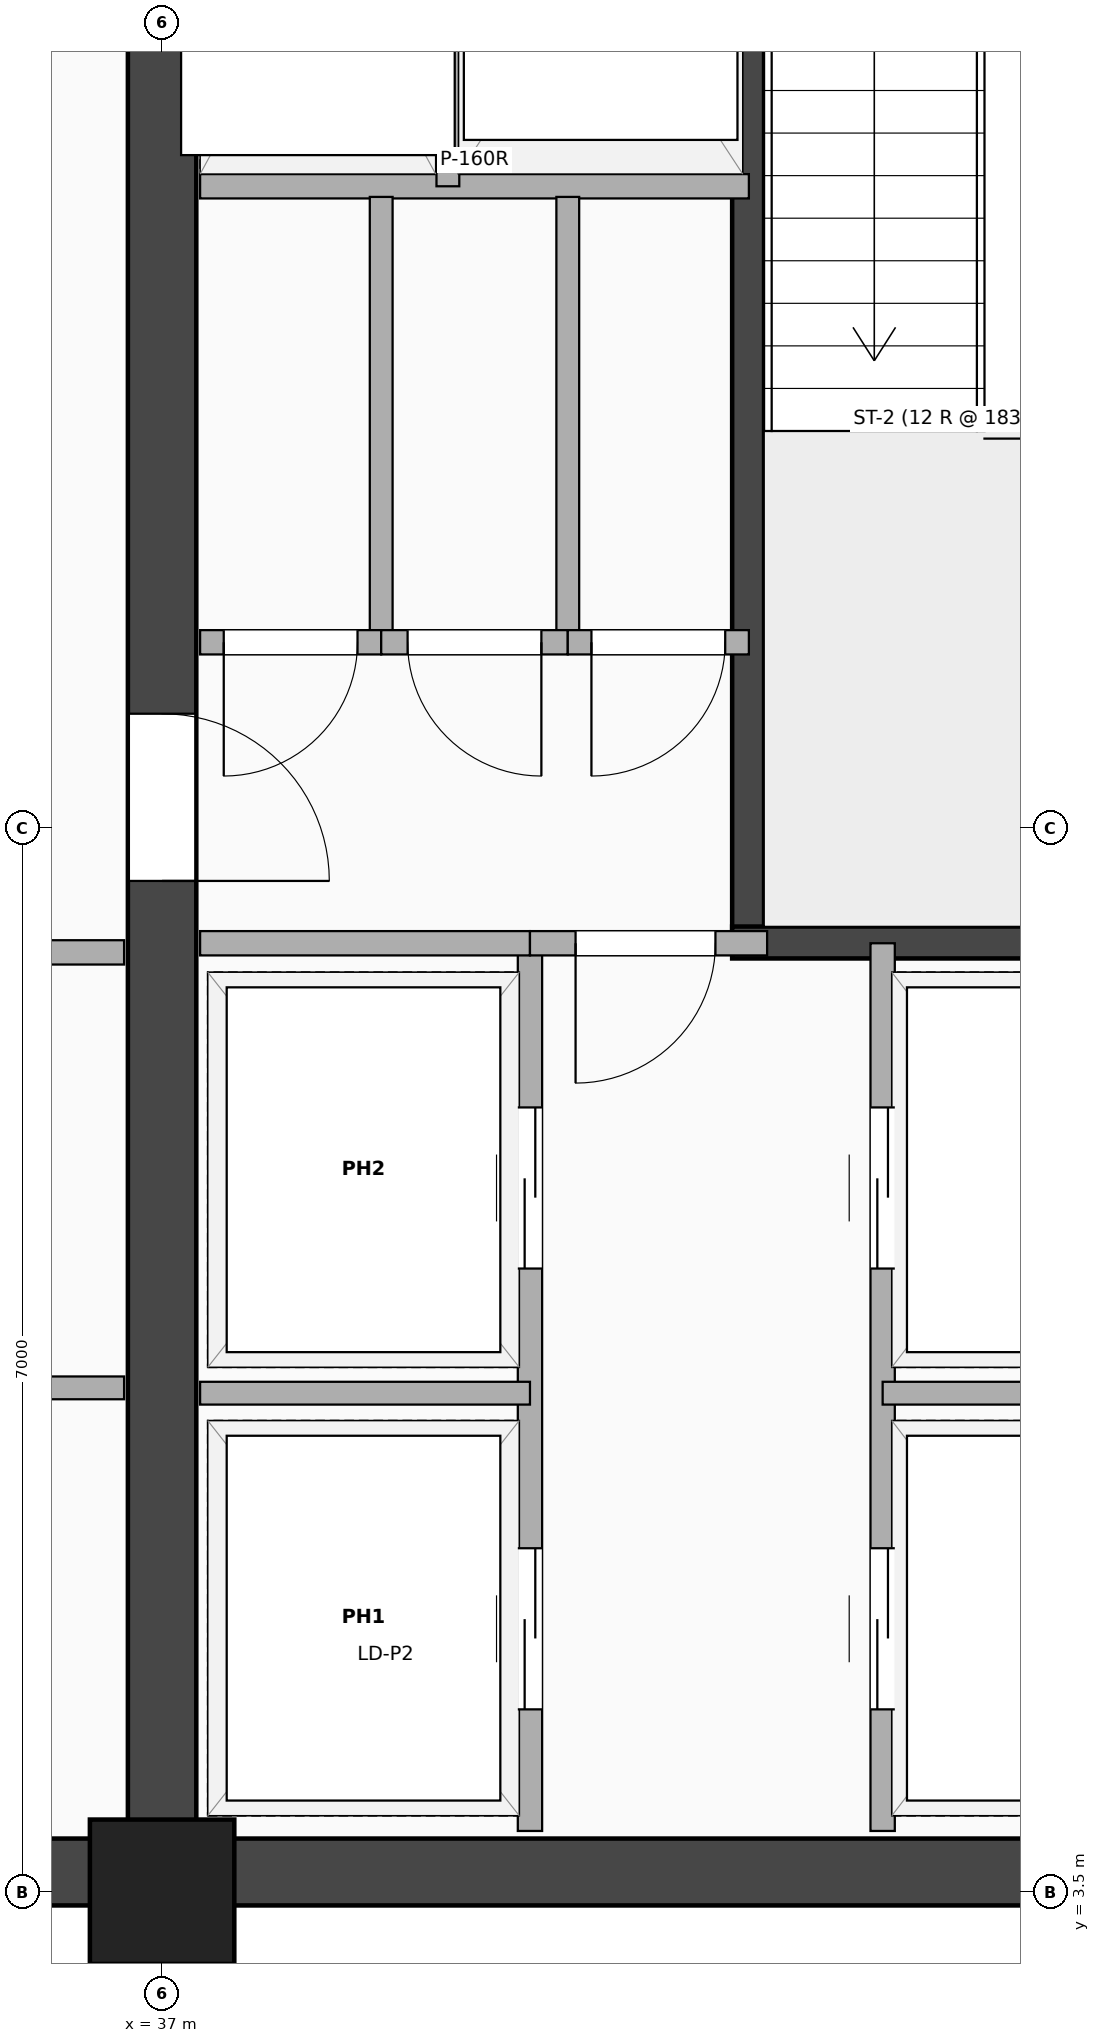
"""IFC4 building model, lengths in metres.
Left out: names, types, materials, properties, quantities, classifications, styles, units other than length and angle.
Written with IfcOpenShell. Run it as: python <this file> out.ifc"""

import sys

from ifc_helpers import new_model, si_unit, direction, frame, frame_2d, origin, origin_2d, place, context, subcontext, project, spatial, rectangle, extrude, element, fill, save


model = new_model("IFC4")
c1 = context("Model", 3, precision=1e-05, world=origin(), true_north=direction((0.0, 1.0)))
c2 = subcontext(c1, "Body", "Model", "MODEL_VIEW")
j1 = project(units=[si_unit("LENGTHUNIT", "METRE"), si_unit("PLANEANGLEUNIT", "RADIAN")], contexts=[c1])
p1 = place(None, origin())
s1 = spatial("IfcSite", under=j1, at=p1, CompositionType="ELEMENT")
p2 = place(p1, origin())
s2 = spatial("IfcBuilding", under=s1, at=p2, CompositionType="ELEMENT")
p3 = place(p2, frame((0.0, 0.0, 192.5)))
s3 = spatial("IfcBuildingStorey", under=s2, at=p3, CompositionType="ELEMENT", Elevation=192.5)
p4 = place(p3, frame((20.3, 3.63, 0.0), z_axis=(0.0, 0.0, 1.0), x_axis=(1.0, 0.0, 0.0)))
e1 = element("IfcWall", 1, at=p4, inside=s3, PredefinedType="SHEAR", context=c2, shape_type="SweptSolid", body=[
    extrude(rectangle(XDim=24.5, YDim=0.44, at=frame_2d((12.25, 0.0))), origin(), (0.0, 0.0, 1.0), 4.16),
])
p5 = place(p3, frame((37.0, 3.5, 0.0), z_axis=(0.0, 0.0, 1.0), x_axis=(0.0, 1.0, 0.0)))
e2 = element("IfcWall", 2, at=p5, inside=s3, PredefinedType="SHEAR", context=c2, shape_type="SweptSolid", body=[
    extrude(rectangle(XDim=14.95, YDim=0.45, at=frame_2d((7.475, 0.0))), origin(), (0.0, 0.0, 1.0), 4.16),
])
p6 = place(p5, frame((6.65, 0.0, 0.0)))
e3 = element("IfcOpeningElement", 3, at=p6, cuts=e2, PredefinedType="OPENING", context=c2, shape_type="SweptSolid", body=[
    extrude(rectangle(XDim=1.1, YDim=2.15, at=frame_2d((0.55, 1.075))), frame((0.0, 0.235, 0.0), z_axis=(0.0, -1.0, 0.0), x_axis=(1.0, 0.0, 0.0)), (0.0, 0.0, 1.0), 0.47),
])
p7 = place(p3, frame((40.855, 9.745, 0.0), z_axis=(0.0, 0.0, 1.0), x_axis=(0.0, 1.0, 0.0)))
e4 = element("IfcWall", 4, at=p7, inside=s3, PredefinedType="SHEAR", context=c2, shape_type="SweptSolid", body=[
    extrude(rectangle(XDim=8.01, YDim=0.21, at=frame_2d((4.005, 0.0))), origin(), (0.0, 0.0, 1.0), 4.16),
])
p8 = place(p3, frame((40.75, 9.745, 0.0), z_axis=(0.0, 0.0, 1.0), x_axis=(1.0, 0.0, 0.0)))
e5 = element("IfcWall", 5, at=p8, inside=s3, PredefinedType="SHEAR", context=c2, shape_type="SweptSolid", body=[
    extrude(rectangle(XDim=3.66, YDim=0.21, at=frame_2d((1.83, 0.0))), origin(), (0.0, 0.0, 1.0), 4.16),
])
p9 = place(p3, frame((37.0, 3.5, -0.24), z_axis=(0.0, 0.0, 1.0), x_axis=(1.0, 0.0, 0.0)))
e6 = element("IfcColumn", 6, at=p9, inside=s3, PredefinedType="COLUMN", context=c2, shape_type="SweptSolid", body=[
    extrude(rectangle(XDim=0.95, YDim=0.95, at=origin_2d()), origin(), (0.0, 0.0, 1.0), 4.4),
])
p10 = place(p3, frame((37.25, 14.72, 0.0), z_axis=(0.0, 0.0, 1.0), x_axis=(1.0, 0.0, 0.0)))
e7 = element("IfcWall", 7, at=p10, inside=s3, PredefinedType="PARTITIONING", context=c2, shape_type="SweptSolid", body=[
    extrude(rectangle(XDim=3.61, YDim=0.16, at=frame_2d((1.805, 0.0))), origin(), (0.0, 0.0, 1.0), 4.16),
])
p11 = place(p3, frame((38.88, 14.72, 0.0), z_axis=(0.0, 0.0, 1.0), x_axis=(0.0, 1.0, 0.0)))
e8 = element("IfcWall", 8, at=p11, inside=s3, PredefinedType="PARTITIONING", context=c2, shape_type="SweptSolid", body=[
    extrude(rectangle(XDim=3.04, YDim=0.15, at=frame_2d((1.52, 0.0))), origin(), (0.0, 0.0, 1.0), 4.16),
])
p12 = place(p3, frame((38.441, 11.72, 0.0), z_axis=(0.0, 0.0, 1.0), x_axis=(0.0, 1.0, 0.0)))
e9 = element("IfcWall", 9, at=p12, inside=s3, PredefinedType="PARTITIONING", context=c2, shape_type="SweptSolid", body=[
    extrude(rectangle(XDim=2.93, YDim=0.15, at=frame_2d((1.465, 0.0))), origin(), (0.0, 0.0, 1.0), 4.16),
])
p13 = place(p3, frame((37.25, 11.72, 0.0), z_axis=(0.0, 0.0, 1.0), x_axis=(1.0, 0.0, 0.0)))
e10 = element("IfcWall", 10, at=p13, inside=s3, PredefinedType="PARTITIONING", context=c2, shape_type="SweptSolid", body=[
    extrude(rectangle(XDim=1.191, YDim=0.16, at=frame_2d((0.596, 0.0))), origin(), (0.0, 0.0, 1.0), 4.16),
])
p14 = place(p13, frame((0.156, 0.0, 0.0)))
e11 = element("IfcOpeningElement", 11, at=p14, cuts=e10, PredefinedType="OPENING", context=c2, shape_type="SweptSolid", body=[
    extrude(rectangle(XDim=0.88, YDim=2.08, at=frame_2d((0.44, 1.04))), frame((0.0, 0.09, 0.0), z_axis=(0.0, -1.0, 0.0), x_axis=(1.0, 0.0, 0.0)), (0.0, 0.0, 1.0), 0.18),
])
p15 = place(p3, frame((39.669, 11.72, 0.0), z_axis=(0.0, 0.0, 1.0), x_axis=(0.0, 1.0, 0.0)))
e12 = element("IfcWall", 12, at=p15, inside=s3, PredefinedType="PARTITIONING", context=c2, shape_type="SweptSolid", body=[
    extrude(rectangle(XDim=2.93, YDim=0.15, at=frame_2d((1.465, 0.0))), origin(), (0.0, 0.0, 1.0), 4.16),
])
p16 = place(p3, frame((38.441, 11.72, 0.0), z_axis=(0.0, 0.0, 1.0), x_axis=(1.0, 0.0, 0.0)))
e13 = element("IfcWall", 13, at=p16, inside=s3, PredefinedType="PARTITIONING", context=c2, shape_type="SweptSolid", body=[
    extrude(rectangle(XDim=1.227, YDim=0.16, at=frame_2d((0.614, 0.0))), origin(), (0.0, 0.0, 1.0), 4.16),
])
p17 = place(p16, frame((0.174, 0.0, 0.0)))
e14 = element("IfcOpeningElement", 14, at=p17, cuts=e13, PredefinedType="OPENING", context=c2, shape_type="SweptSolid", body=[
    extrude(rectangle(XDim=0.88, YDim=2.08, at=frame_2d((0.44, 1.04))), frame((0.0, 0.09, 0.0), z_axis=(0.0, -1.0, 0.0), x_axis=(1.0, 0.0, 0.0)), (0.0, 0.0, 1.0), 0.18),
])
p18 = place(p3, frame((39.669, 11.72, 0.0), z_axis=(0.0, 0.0, 1.0), x_axis=(1.0, 0.0, 0.0)))
e15 = element("IfcWall", 15, at=p18, inside=s3, PredefinedType="PARTITIONING", context=c2, shape_type="SweptSolid", body=[
    extrude(rectangle(XDim=1.191, YDim=0.16, at=frame_2d((0.596, 0.0))), origin(), (0.0, 0.0, 1.0), 4.16),
])
p19 = place(p18, frame((0.156, 0.0, 0.0)))
e16 = element("IfcOpeningElement", 16, at=p19, cuts=e15, PredefinedType="OPENING", context=c2, shape_type="SweptSolid", body=[
    extrude(rectangle(XDim=0.88, YDim=2.08, at=frame_2d((0.44, 1.04))), frame((0.0, 0.09, 0.0), z_axis=(0.0, -1.0, 0.0), x_axis=(1.0, 0.0, 0.0)), (0.0, 0.0, 1.0), 0.18),
])
p20 = place(p3, frame((39.42, 3.9, 0.0), z_axis=(0.0, 0.0, 1.0), x_axis=(0.0, 1.0, 0.0)))
e17 = element("IfcWall", 17, at=p20, inside=s3, PredefinedType="PARTITIONING", context=c2, shape_type="SweptSolid", body=[
    extrude(rectangle(XDim=5.84, YDim=0.16, at=frame_2d((2.92, 0.0))), origin(), (0.0, 0.0, 1.0), 4.16),
])
p21 = place(p20, frame((1.86, 0.0, 0.0), z_axis=(0.0, 0.0, 1.0), x_axis=(-1.0, 0.0, 0.0)))
e18 = element("IfcOpeningElement", 18, at=p21, cuts=e17, PredefinedType="OPENING", context=c2, shape_type="SweptSolid", body=[
    extrude(rectangle(XDim=1.06, YDim=2.16, at=frame_2d((0.53, 1.08))), frame((0.0, 0.09, 0.0), z_axis=(0.0, -1.0, 0.0), x_axis=(1.0, 0.0, 0.0)), (0.0, 0.0, 1.0), 0.18),
])
p22 = place(p20, frame((4.76, 0.0, 0.0), z_axis=(0.0, 0.0, 1.0), x_axis=(-1.0, 0.0, 0.0)))
e19 = element("IfcOpeningElement", 19, at=p22, cuts=e17, PredefinedType="OPENING", context=c2, shape_type="SweptSolid", body=[
    extrude(rectangle(XDim=1.06, YDim=2.16, at=frame_2d((0.53, 1.08))), frame((0.0, 0.09, 0.0), z_axis=(0.0, -1.0, 0.0), x_axis=(1.0, 0.0, 0.0)), (0.0, 0.0, 1.0), 0.18),
])
p23 = place(p3, frame((41.74, 3.9, 0.0), z_axis=(0.0, 0.0, 1.0), x_axis=(0.0, 1.0, 0.0)))
e20 = element("IfcWall", 20, at=p23, inside=s3, PredefinedType="PARTITIONING", context=c2, shape_type="SweptSolid", body=[
    extrude(rectangle(XDim=5.84, YDim=0.16, at=frame_2d((2.92, 0.0))), origin(), (0.0, 0.0, 1.0), 4.16),
])
p24 = place(p23, frame((0.8, 0.0, 0.0)))
e21 = element("IfcOpeningElement", 21, at=p24, cuts=e20, PredefinedType="OPENING", context=c2, shape_type="SweptSolid", body=[
    extrude(rectangle(XDim=1.06, YDim=2.16, at=frame_2d((0.53, 1.08))), frame((0.0, 0.09, 0.0), z_axis=(0.0, -1.0, 0.0), x_axis=(1.0, 0.0, 0.0)), (0.0, 0.0, 1.0), 0.18),
])
p25 = place(p23, frame((3.7, 0.0, 0.0)))
e22 = element("IfcOpeningElement", 22, at=p25, cuts=e20, PredefinedType="OPENING", context=c2, shape_type="SweptSolid", body=[
    extrude(rectangle(XDim=1.06, YDim=2.16, at=frame_2d((0.53, 1.08))), frame((0.0, 0.09, 0.0), z_axis=(0.0, -1.0, 0.0), x_axis=(1.0, 0.0, 0.0)), (0.0, 0.0, 1.0), 0.18),
])
p26 = place(p3, frame((37.25, 6.78, 0.0), z_axis=(0.0, 0.0, 1.0), x_axis=(1.0, 0.0, 0.0)))
e23 = element("IfcWall", 23, at=p26, inside=s3, PredefinedType="PARTITIONING", context=c2, shape_type="SweptSolid", body=[
    extrude(rectangle(XDim=2.17, YDim=0.15, at=frame_2d((1.085, 0.0))), origin(), (0.0, 0.0, 1.0), 4.16),
])
p27 = place(p3, frame((41.74, 6.78, 0.0), z_axis=(0.0, 0.0, 1.0), x_axis=(1.0, 0.0, 0.0)))
e24 = element("IfcWall", 24, at=p27, inside=s3, PredefinedType="PARTITIONING", context=c2, shape_type="SweptSolid", body=[
    extrude(rectangle(XDim=2.66, YDim=0.15, at=frame_2d((1.33, 0.0))), origin(), (0.0, 0.0, 1.0), 3.372),
])
p28 = place(p3, frame((37.25, 9.74, 0.0), z_axis=(0.0, 0.0, 1.0), x_axis=(1.0, 0.0, 0.0)))
e25 = element("IfcWall", 25, at=p28, inside=s3, PredefinedType="PARTITIONING", context=c2, shape_type="SweptSolid", body=[
    extrude(rectangle(XDim=2.17, YDim=0.16, at=frame_2d((1.085, 0.0))), origin(), (0.0, 0.0, 1.0), 4.16),
])
p29 = place(p3, frame((39.42, 9.74, 0.0), z_axis=(0.0, 0.0, 1.0), x_axis=(1.0, 0.0, 0.0)))
e26 = element("IfcWall", 26, at=p29, inside=s3, PredefinedType="PARTITIONING", context=c2, shape_type="SweptSolid", body=[
    extrude(rectangle(XDim=1.56, YDim=0.16, at=frame_2d((0.78, 0.0))), origin(), (0.0, 0.0, 1.0), 4.16),
])
p30 = place(p29, frame((0.3, 0.0, 0.0)))
e27 = element("IfcOpeningElement", 27, at=p30, cuts=e26, PredefinedType="OPENING", context=c2, shape_type="SweptSolid", body=[
    extrude(rectangle(XDim=0.92, YDim=2.08, at=frame_2d((0.46, 1.04))), frame((0.0, 0.09, 0.0), z_axis=(0.0, -1.0, 0.0), x_axis=(1.0, 0.0, 0.0)), (0.0, 0.0, 1.0), 0.18),
])
p31 = place(p3, frame((29.45, 9.68, 0.0), z_axis=(0.0, 0.0, 1.0), x_axis=(1.0, 0.0, 0.0)))
e28 = element("IfcWall", 28, at=p31, inside=s3, PredefinedType="PARTITIONING", context=c2, shape_type="SweptSolid", body=[
    extrude(rectangle(XDim=7.3, YDim=0.16, at=frame_2d((3.65, 0.0))), origin(), (0.0, 0.0, 1.0), 4.16),
])
p32 = place(p31, frame((4.11, 0.0, 0.0), z_axis=(0.0, 0.0, 1.0), x_axis=(-1.0, 0.0, 0.0)))
e29 = element("IfcOpeningElement", 29, at=p32, cuts=e28, PredefinedType="OPENING", context=c2, shape_type="SweptSolid", body=[
    extrude(rectangle(XDim=0.92, YDim=2.08, at=frame_2d((0.46, 1.04))), frame((0.0, 0.09, 0.0), z_axis=(0.0, -1.0, 0.0), x_axis=(1.0, 0.0, 0.0)), (0.0, 0.0, 1.0), 0.18),
])
p33 = place(p3, frame((29.45, 6.815, 0.0), z_axis=(0.0, 0.0, 1.0), x_axis=(1.0, 0.0, 0.0)))
e30 = element("IfcWall", 30, at=p33, inside=s3, PredefinedType="PARTITIONING", context=c2, shape_type="SweptSolid", body=[
    extrude(rectangle(XDim=7.3, YDim=0.15, at=frame_2d((3.65, 0.0))), origin(), (0.0, 0.0, 1.0), 4.16),
])
p34 = place(p33, frame((4.09, 0.0, 0.0), z_axis=(0.0, 0.0, 1.0), x_axis=(-1.0, 0.0, 0.0)))
e31 = element("IfcOpeningElement", 31, at=p34, cuts=e30, PredefinedType="OPENING", context=c2, shape_type="SweptSolid", body=[
    extrude(rectangle(XDim=0.88, YDim=2.08, at=frame_2d((0.44, 1.04))), frame((0.0, 0.085, 0.0), z_axis=(0.0, -1.0, 0.0), x_axis=(1.0, 0.0, 0.0)), (0.0, 0.0, 1.0), 0.17),
])
p35 = place(p6, origin())
e32 = element("IfcDoor", 32, at=p35, inside=s3, OperationType="SINGLE_SWING_LEFT", PredefinedType="DOOR", context=c2, shape_type="SweptSolid", body=[
    extrude(rectangle(XDim=1.1, YDim=2.15, at=frame_2d((0.55, 1.075))), frame((0.0, 0.025, 0.0), z_axis=(0.0, -1.0, 0.0), x_axis=(1.0, 0.0, 0.0)), (0.0, 0.0, 1.0), 0.05),
])
fill(e3, e32)
p36 = place(p14, origin())
e33 = element("IfcDoor", 33, at=p36, inside=s3, OperationType="SINGLE_SWING_LEFT", PredefinedType="DOOR", context=c2, shape_type="SweptSolid", body=[
    extrude(rectangle(XDim=0.88, YDim=2.08, at=frame_2d((0.44, 1.04))), frame((0.0, 0.025, 0.0), z_axis=(0.0, -1.0, 0.0), x_axis=(1.0, 0.0, 0.0)), (0.0, 0.0, 1.0), 0.05),
])
fill(e11, e33)
p37 = place(p17, origin())
e34 = element("IfcDoor", 34, at=p37, inside=s3, OperationType="SINGLE_SWING_RIGHT", PredefinedType="DOOR", context=c2, shape_type="SweptSolid", body=[
    extrude(rectangle(XDim=0.88, YDim=2.08, at=frame_2d((0.44, 1.04))), frame((0.0, 0.025, 0.0), z_axis=(0.0, -1.0, 0.0), x_axis=(1.0, 0.0, 0.0)), (0.0, 0.0, 1.0), 0.05),
])
fill(e14, e34)
p38 = place(p19, origin())
e35 = element("IfcDoor", 35, at=p38, inside=s3, OperationType="SINGLE_SWING_LEFT", PredefinedType="DOOR", context=c2, shape_type="SweptSolid", body=[
    extrude(rectangle(XDim=0.88, YDim=2.08, at=frame_2d((0.44, 1.04))), frame((0.0, 0.025, 0.0), z_axis=(0.0, -1.0, 0.0), x_axis=(1.0, 0.0, 0.0)), (0.0, 0.0, 1.0), 0.05),
])
fill(e16, e35)
p39 = place(p21, origin())
e36 = element("IfcDoor", 36, at=p39, inside=s3, OperationType="DOUBLE_DOOR_SLIDING", PredefinedType="DOOR", context=c2, shape_type="SweptSolid", body=[
    extrude(rectangle(XDim=1.06, YDim=2.16, at=frame_2d((0.53, 1.08))), frame((0.0, 0.025, 0.0), z_axis=(0.0, -1.0, 0.0), x_axis=(1.0, 0.0, 0.0)), (0.0, 0.0, 1.0), 0.05),
])
fill(e18, e36)
p40 = place(p22, origin())
e37 = element("IfcDoor", 37, at=p40, inside=s3, OperationType="DOUBLE_DOOR_SLIDING", PredefinedType="DOOR", context=c2, shape_type="SweptSolid", body=[
    extrude(rectangle(XDim=1.06, YDim=2.16, at=frame_2d((0.53, 1.08))), frame((0.0, 0.025, 0.0), z_axis=(0.0, -1.0, 0.0), x_axis=(1.0, 0.0, 0.0)), (0.0, 0.0, 1.0), 0.05),
])
fill(e19, e37)
p41 = place(p24, origin())
e38 = element("IfcDoor", 38, at=p41, inside=s3, OperationType="DOUBLE_DOOR_SLIDING", PredefinedType="DOOR", context=c2, shape_type="SweptSolid", body=[
    extrude(rectangle(XDim=1.06, YDim=2.16, at=frame_2d((0.53, 1.08))), frame((0.0, 0.025, 0.0), z_axis=(0.0, -1.0, 0.0), x_axis=(1.0, 0.0, 0.0)), (0.0, 0.0, 1.0), 0.05),
])
fill(e21, e38)
p42 = place(p25, origin())
e39 = element("IfcDoor", 39, at=p42, inside=s3, OperationType="DOUBLE_DOOR_SLIDING", PredefinedType="DOOR", context=c2, shape_type="SweptSolid", body=[
    extrude(rectangle(XDim=1.06, YDim=2.16, at=frame_2d((0.53, 1.08))), frame((0.0, 0.025, 0.0), z_axis=(0.0, -1.0, 0.0), x_axis=(1.0, 0.0, 0.0)), (0.0, 0.0, 1.0), 0.05),
])
fill(e22, e39)
p43 = place(p30, origin())
e40 = element("IfcDoor", 40, at=p43, inside=s3, OperationType="SINGLE_SWING_LEFT", PredefinedType="DOOR", context=c2, shape_type="SweptSolid", body=[
    extrude(rectangle(XDim=0.92, YDim=2.08, at=frame_2d((0.46, 1.04))), frame((0.0, 0.025, 0.0), z_axis=(0.0, -1.0, 0.0), x_axis=(1.0, 0.0, 0.0)), (0.0, 0.0, 1.0), 0.05),
])
fill(e27, e40)
save(model, sys.argv[1])
